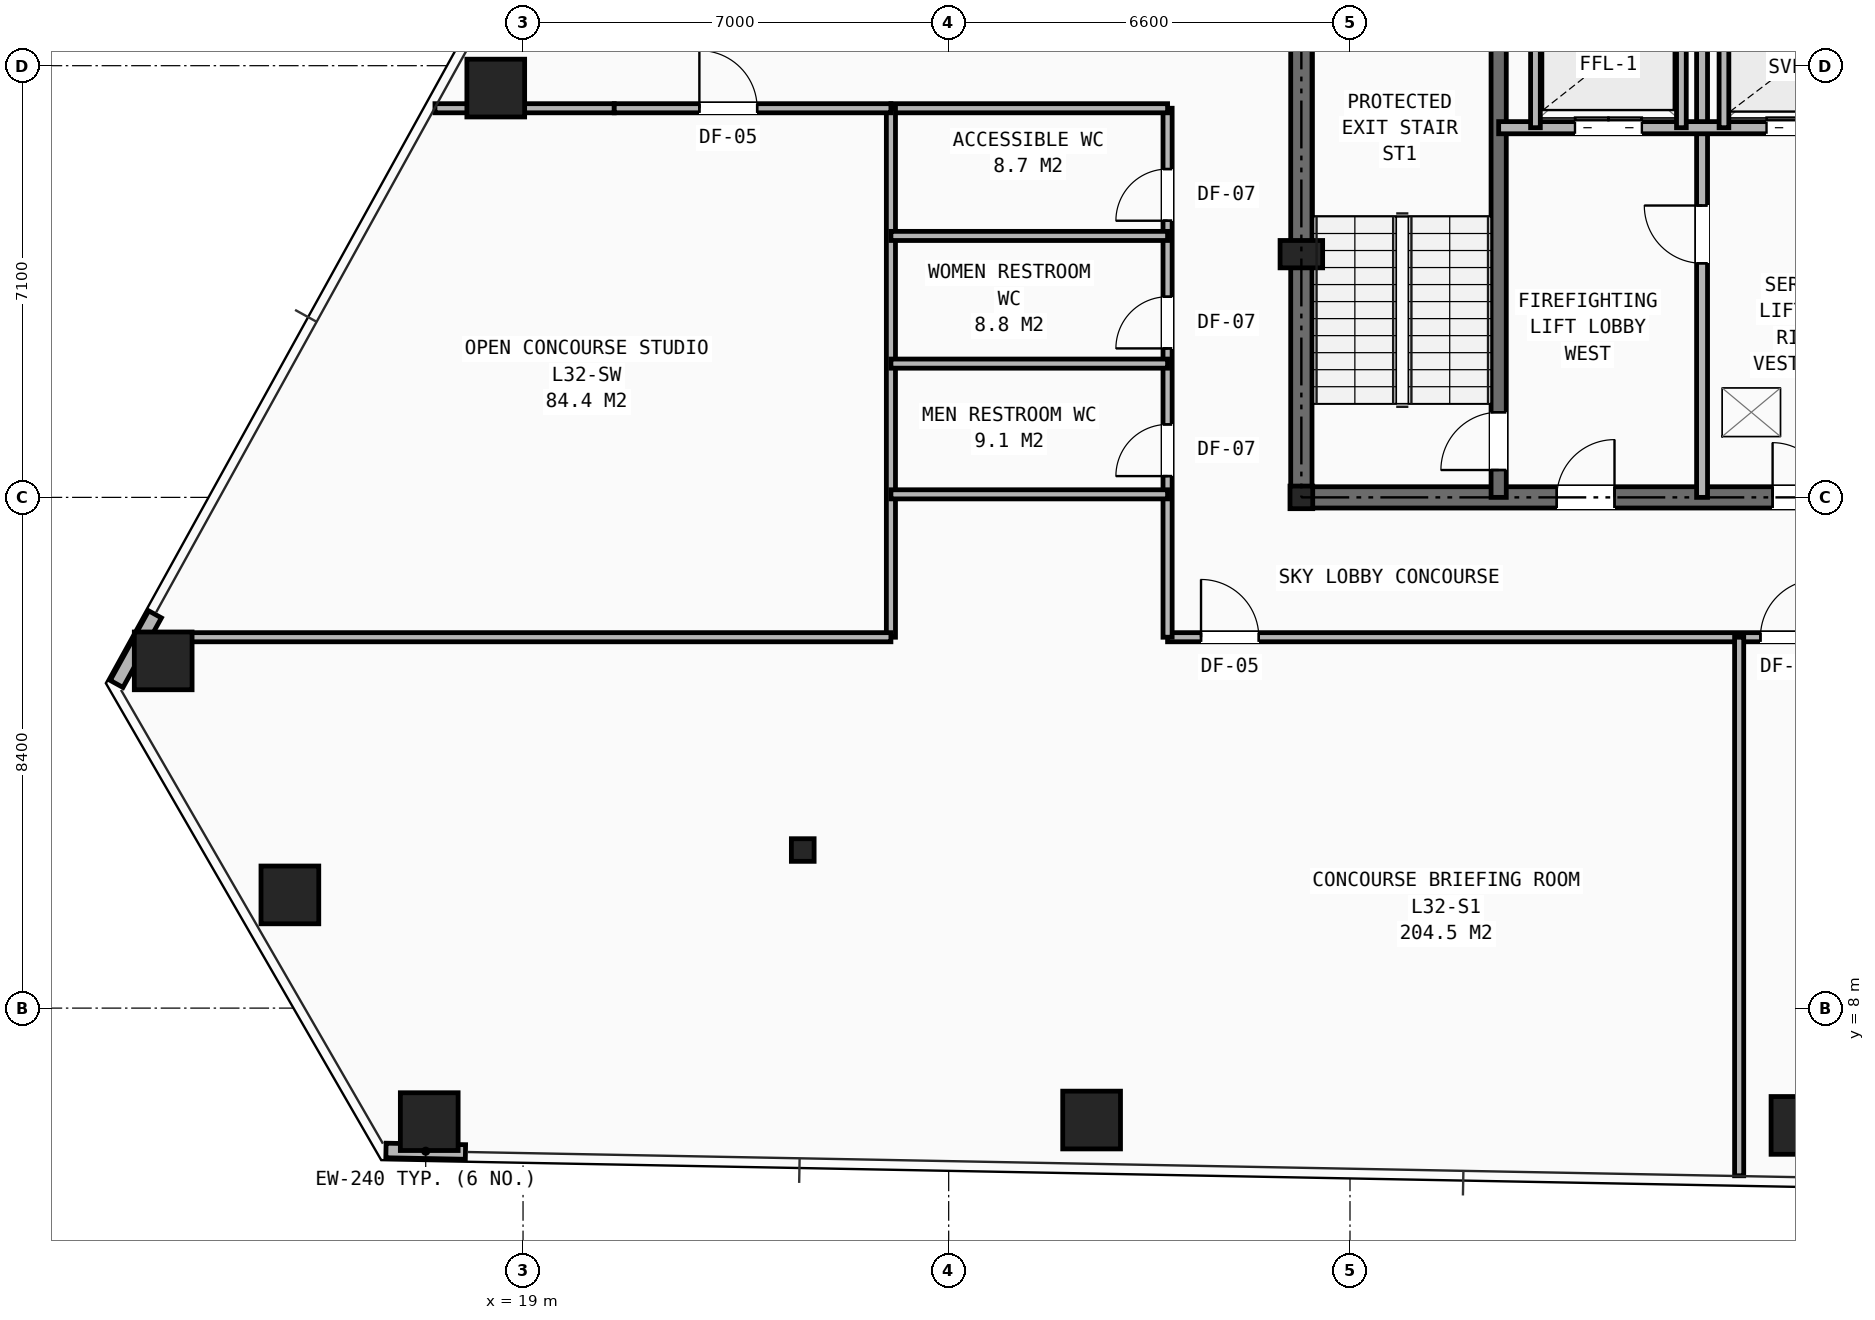
"""IFC4 building model, lengths in metres.
Left out: names, types, materials, properties, quantities, classifications, styles, units other than length and angle.
Written with IfcOpenShell. Run it as: python <this file> out.ifc"""

import sys

from ifc_helpers import new_model, si_unit, direction, frame, frame_2d, origin, origin_2d, place, context, subcontext, project, spatial, rectangle, hollow_rectangle, i_section, extrude, element, fill, save


model = new_model("IFC4")
c1 = context("Model", 3, precision=1e-05, world=origin(), true_north=direction((0.0, 1.0)))
c2 = subcontext(c1, "Body", "Model", "MODEL_VIEW")
j1 = project(units=[si_unit("LENGTHUNIT", "METRE"), si_unit("PLANEANGLEUNIT", "RADIAN")], contexts=[c1])
p1 = place(None, origin())
s1 = spatial("IfcSite", under=j1, at=p1, CompositionType="ELEMENT")
p2 = place(p1, origin())
s2 = spatial("IfcBuilding", under=s1, at=p2, CompositionType="ELEMENT")
p3 = place(p2, frame((0.0, 0.0, 111.8)))
s3 = spatial("IfcBuildingStorey", under=s2, at=p3, CompositionType="ELEMENT", Elevation=111.8)
for number, where, z_axis, x_axis in (
    (1, (31.8, 16.4, 0.0), (0.0, 0.0, 1.0), (1.0, 0.0, 0.0)),
    (2, (23.6, 10.6, 0.0), (0.0, 0.0, 1.0), (1.0, 0.0, 0.0)),
):
    element("IfcColumn", number, at=place(p3, frame(where, z_axis=z_axis, x_axis=x_axis)), inside=s3, PredefinedType="COLUMN", context=c2, shape_type="SweptSolid", body=[
        extrude(i_section(OverallWidth=0.374, OverallDepth=0.372, WebThickness=0.016, FlangeThickness=0.026, at=origin_2d()), origin(), (0.0, 0.0, 1.0), 4.2),
    ])
p4 = place(p3, frame((31.8, 20.4, 0.0), z_axis=(0.0, 0.0, 1.0), x_axis=(1.0, 0.0, 0.0)))
e3 = element("IfcColumn", 3, at=p4, inside=s3, PredefinedType="PILASTER", context=c2, shape_type="SweptSolid", body=[
    extrude(rectangle(XDim=0.7, YDim=0.45, at=origin_2d()), origin(), (0.0, 0.0, 1.0), 4.2),
])
for number, where, z_axis, x_axis in (
    (4, (18.552, 23.132, 0.0), (0.0, 0.0, 1.0), (1.0, 0.0, 0.0)),
    (5, (13.082, 13.711, 0.0), (0.0, 0.0, 1.0), (1.0, 0.0, 0.0)),
    (6, (15.166, 9.862, 0.0), (0.0, 0.0, 1.0), (1.0, 0.0, 0.0)),
    (7, (17.458, 6.133, 0.0), (0.0, 0.0, 1.0), (1.0, 0.0, 0.0)),
    (8, (28.351, 6.159, 0.0), (0.0, 0.0, 1.0), (1.0, 0.0, 0.0)),
    (9, (40.0, 6.071, 0.0), (0.0, 0.0, 1.0), (1.0, 0.0, 0.0)),
):
    element("IfcColumn", number, at=place(p3, frame(where, z_axis=z_axis, x_axis=x_axis)), inside=s3, PredefinedType="COLUMN", context=c2, shape_type="SweptSolid", body=[
        extrude(hollow_rectangle(XDim=0.95, YDim=0.95, WallThickness=0.065, at=origin_2d()), origin(), (0.0, 0.0, 1.0), 4.2),
    ])
for number, where, z_axis, x_axis in (
    (10, (12.948, 14.477, 0.0), (0.0, 0.0, 1.0), (-0.484, -0.875, 0.0)),
    (11, (16.746, 5.658, 0.0), (0.0, 0.0, 1.0), (1.0, -0.019, 0.0)),
):
    element("IfcWall", number, at=place(p3, frame(where, z_axis=z_axis, x_axis=x_axis)), inside=s3, PredefinedType="SHEAR", context=c2, shape_type="SweptSolid", body=[
        extrude(rectangle(XDim=1.308, YDim=0.24, at=frame_2d((0.654, 0.0))), origin(), (0.0, 0.0, 1.0), 3.243),
    ])
p5 = place(p3, frame((31.8, 16.4, 0.0), z_axis=(0.0, 0.0, 1.0), x_axis=(1.0, 0.0, 0.0)))
e12 = element("IfcWall", 12, at=p5, inside=s3, PredefinedType="SHEAR", context=c2, shape_type="SweptSolid", body=[
    extrude(rectangle(XDim=16.4, YDim=0.35, at=frame_2d((8.2, 0.0))), origin(), (0.0, 0.0, 1.0), 3.96),
])
p6 = place(p5, frame((7.75, 0.0, 0.0)))
e13 = element("IfcOpeningElement", 13, at=p6, cuts=e12, PredefinedType="OPENING", context=c2, shape_type="SweptSolid", body=[
    extrude(rectangle(XDim=0.9, YDim=2.1, at=frame_2d((0.45, 1.05))), frame((0.0, 0.185, 0.0), z_axis=(0.0, -1.0, 0.0), x_axis=(1.0, 0.0, 0.0)), (0.0, 0.0, 1.0), 0.37),
])
p7 = place(p5, frame((4.2, 0.0, 0.0)))
e14 = element("IfcOpeningElement", 14, at=p7, cuts=e12, PredefinedType="OPENING", context=c2, shape_type="SweptSolid", body=[
    extrude(rectangle(XDim=0.95, YDim=2.1, at=frame_2d((0.475, 1.05))), frame((0.0, 0.185, 0.0), z_axis=(0.0, -1.0, 0.0), x_axis=(1.0, 0.0, 0.0)), (0.0, 0.0, 1.0), 0.37),
])
p8 = place(p5, frame((10.6, 0.0, 0.0)))
e15 = element("IfcOpeningElement", 15, at=p8, cuts=e12, PredefinedType="OPENING", context=c2, shape_type="SweptSolid", body=[
    extrude(rectangle(XDim=0.95, YDim=2.1, at=frame_2d((0.475, 1.05))), frame((0.0, 0.185, 0.0), z_axis=(0.0, -1.0, 0.0), x_axis=(1.0, 0.0, 0.0)), (0.0, 0.0, 1.0), 0.37),
])
p9 = place(p3, frame((31.8, 16.4, 0.0), z_axis=(0.0, 0.0, 1.0), x_axis=(0.0, 1.0, 0.0)))
e16 = element("IfcWall", 16, at=p9, inside=s3, PredefinedType="SHEAR", context=c2, shape_type="SweptSolid", body=[
    extrude(rectangle(XDim=14.8, YDim=0.35, at=frame_2d((7.4, 0.0))), origin(), (0.0, 0.0, 1.0), 3.96),
])
p10 = place(p9, frame((11.0, 0.0, 0.0)))
e17 = element("IfcOpeningElement", 17, at=p10, cuts=e16, PredefinedType="OPENING", context=c2, shape_type="SweptSolid", body=[
    extrude(rectangle(XDim=1.1, YDim=2.15, at=frame_2d((0.55, 1.075))), frame((0.0, 0.185, 0.0), z_axis=(0.0, -1.0, 0.0), x_axis=(1.0, 0.0, 0.0)), (0.0, 0.0, 1.0), 0.37),
])
p11 = place(p3, frame((35.045, 16.4, 0.0), z_axis=(0.0, 0.0, 1.0), x_axis=(0.0, 1.0, 0.0)))
e18 = element("IfcWall", 18, at=p11, inside=s3, PredefinedType="SHEAR", context=c2, shape_type="SweptSolid", body=[
    extrude(rectangle(XDim=8.4, YDim=0.25, at=frame_2d((4.2, 0.0))), origin(), (0.0, 0.0, 1.0), 3.96),
])
p12 = place(p11, frame((0.45, 0.0, 0.0)))
e19 = element("IfcOpeningElement", 19, at=p12, cuts=e18, PredefinedType="OPENING", context=c2, shape_type="SweptSolid", body=[
    extrude(rectangle(XDim=0.95, YDim=2.1, at=frame_2d((0.475, 1.05))), frame((0.0, 0.135, 0.0), z_axis=(0.0, -1.0, 0.0), x_axis=(1.0, 0.0, 0.0)), (0.0, 0.0, 1.0), 0.27),
])
p13 = place(p3, frame((38.39, 16.4, 0.0), z_axis=(0.0, 0.0, 1.0), x_axis=(0.0, 1.0, 0.0)))
e20 = element("IfcWall", 20, at=p13, inside=s3, PredefinedType="PARTITIONING", context=c2, shape_type="SweptSolid", body=[
    extrude(rectangle(XDim=8.4, YDim=0.18, at=frame_2d((4.2, 0.0))), origin(), (0.0, 0.0, 1.0), 3.411),
])
p14 = place(p13, frame((3.85, 0.0, 0.0)))
e21 = element("IfcOpeningElement", 21, at=p14, cuts=e20, PredefinedType="OPENING", context=c2, shape_type="SweptSolid", body=[
    extrude(rectangle(XDim=0.95, YDim=2.1, at=frame_2d((0.475, 1.05))), frame((0.0, 0.1, 0.0), z_axis=(0.0, -1.0, 0.0), x_axis=(1.0, 0.0, 0.0)), (0.0, 0.0, 1.0), 0.2),
])
p15 = place(p3, frame((35.045, 22.48, 0.0), z_axis=(0.0, 0.0, 1.0), x_axis=(1.0, 0.0, 0.0)))
e22 = element("IfcWall", 22, at=p15, inside=s3, PredefinedType="SOLIDWALL", context=c2, shape_type="SweptSolid", body=[
    extrude(rectangle(XDim=9.91, YDim=0.2, at=frame_2d((4.955, 0.0))), origin(), (0.0, 0.0, 1.0), 3.96),
])
p16 = place(p15, frame((1.255, 0.0, 0.0)))
e23 = element("IfcOpeningElement", 23, at=p16, cuts=e22, PredefinedType="OPENING", context=c2, shape_type="SweptSolid", body=[
    extrude(rectangle(XDim=1.1, YDim=2.15, at=frame_2d((0.55, 1.075))), frame((0.0, 0.11, 0.0), z_axis=(0.0, -1.0, 0.0), x_axis=(1.0, 0.0, 0.0)), (0.0, 0.0, 1.0), 0.22),
])
p17 = place(p15, frame((7.555, 0.0, 0.0)))
e24 = element("IfcOpeningElement", 24, at=p17, cuts=e22, PredefinedType="OPENING", context=c2, shape_type="SweptSolid", body=[
    extrude(rectangle(XDim=1.1, YDim=2.15, at=frame_2d((0.55, 1.075))), frame((0.0, 0.11, 0.0), z_axis=(0.0, -1.0, 0.0), x_axis=(1.0, 0.0, 0.0)), (0.0, 0.0, 1.0), 0.22),
])
p18 = place(p15, frame((4.405, 0.0, 0.0)))
e25 = element("IfcOpeningElement", 25, at=p18, cuts=e22, PredefinedType="OPENING", context=c2, shape_type="SweptSolid", body=[
    extrude(rectangle(XDim=1.1, YDim=2.15, at=frame_2d((0.55, 1.075))), frame((0.0, 0.11, 0.0), z_axis=(0.0, -1.0, 0.0), x_axis=(1.0, 0.0, 0.0)), (0.0, 0.0, 1.0), 0.22),
])
for number, where, z_axis, x_axis in (
    (26, (35.65, 22.48, 0.0), (0.0, 0.0, 1.0), (0.0, 1.0, 0.0)),
    (27, (38.05, 22.48, 0.0), (0.0, 0.0, 1.0), (0.0, 1.0, 0.0)),
    (28, (38.75, 22.48, 0.0), (0.0, 0.0, 1.0), (0.0, 1.0, 0.0)),
):
    element("IfcWall", number, at=place(p3, frame(where, z_axis=z_axis, x_axis=x_axis)), inside=s3, PredefinedType="SOLIDWALL", context=c2, shape_type="SweptSolid", body=[
        extrude(rectangle(XDim=2.32, YDim=0.16, at=frame_2d((1.16, 0.0))), origin(), (0.0, 0.0, 1.0), 3.96),
    ])
p19 = place(p3, frame((29.6, 14.1, 0.0), z_axis=(0.0, 0.0, 1.0), x_axis=(1.0, 0.0, 0.0)))
e29 = element("IfcWall", 29, at=p19, inside=s3, PredefinedType="PARTITIONING", context=c2, shape_type="SweptSolid", body=[
    extrude(rectangle(XDim=18.6, YDim=0.15, at=frame_2d((9.3, 0.0))), origin(), (0.0, 0.0, 1.0), 2.975),
])
p20 = place(p19, frame((0.55, 0.0, 0.0)))
e30 = element("IfcOpeningElement", 30, at=p20, cuts=e29, PredefinedType="OPENING", context=c2, shape_type="SweptSolid", body=[
    extrude(rectangle(XDim=0.95, YDim=2.1, at=frame_2d((0.475, 1.05))), frame((0.0, 0.085, 0.0), z_axis=(0.0, -1.0, 0.0), x_axis=(1.0, 0.0, 0.0)), (0.0, 0.0, 1.0), 0.17),
])
p21 = place(p19, frame((9.75, 0.0, 0.0)))
e31 = element("IfcOpeningElement", 31, at=p21, cuts=e29, PredefinedType="OPENING", context=c2, shape_type="SweptSolid", body=[
    extrude(rectangle(XDim=0.95, YDim=2.1, at=frame_2d((0.475, 1.05))), frame((0.0, 0.085, 0.0), z_axis=(0.0, -1.0, 0.0), x_axis=(1.0, 0.0, 0.0)), (0.0, 0.0, 1.0), 0.17),
])
p22 = place(p3, frame((29.6, 14.1, 0.0), z_axis=(0.0, 0.0, 1.0), x_axis=(0.0, 1.0, 0.0)))
e32 = element("IfcWall", 32, at=p22, inside=s3, PredefinedType="PARTITIONING", context=c2, shape_type="SweptSolid", body=[
    extrude(rectangle(XDim=8.7, YDim=0.15, at=frame_2d((4.35, 0.0))), origin(), (0.0, 0.0, 1.0), 3.96),
])
p23 = place(p22, frame((2.65, 0.0, 0.0)))
e33 = element("IfcOpeningElement", 33, at=p23, cuts=e32, PredefinedType="OPENING", context=c2, shape_type="SweptSolid", body=[
    extrude(rectangle(XDim=0.85, YDim=2.05, at=frame_2d((0.425, 1.025))), frame((0.0, 0.085, 0.0), z_axis=(0.0, -1.0, 0.0), x_axis=(1.0, 0.0, 0.0)), (0.0, 0.0, 1.0), 0.17),
])
p24 = place(p22, frame((4.75, 0.0, 0.0)))
e34 = element("IfcOpeningElement", 34, at=p24, cuts=e32, PredefinedType="OPENING", context=c2, shape_type="SweptSolid", body=[
    extrude(rectangle(XDim=0.85, YDim=2.05, at=frame_2d((0.425, 1.025))), frame((0.0, 0.085, 0.0), z_axis=(0.0, -1.0, 0.0), x_axis=(1.0, 0.0, 0.0)), (0.0, 0.0, 1.0), 0.17),
])
p25 = place(p22, frame((6.85, 0.0, 0.0)))
e35 = element("IfcOpeningElement", 35, at=p25, cuts=e32, PredefinedType="OPENING", context=c2, shape_type="SweptSolid", body=[
    extrude(rectangle(XDim=0.85, YDim=2.05, at=frame_2d((0.425, 1.025))), frame((0.0, 0.085, 0.0), z_axis=(0.0, -1.0, 0.0), x_axis=(1.0, 0.0, 0.0)), (0.0, 0.0, 1.0), 0.17),
])
p26 = place(p3, frame((17.552, 22.8, 0.0), z_axis=(0.0, 0.0, 1.0), x_axis=(1.0, 0.0, 0.0)))
e36 = element("IfcWall", 36, at=p26, inside=s3, PredefinedType="PARTITIONING", context=c2, shape_type="SweptSolid", body=[
    extrude(rectangle(XDim=2.948, YDim=0.15, at=frame_2d((1.474, 0.0))), origin(), (0.0, 0.0, 1.0), 3.248),
])
p27 = place(p3, frame((25.05, 22.8, 0.0), z_axis=(0.0, 0.0, 1.0), x_axis=(1.0, 0.0, 0.0)))
e37 = element("IfcWall", 37, at=p27, inside=s3, PredefinedType="PARTITIONING", context=c2, shape_type="SweptSolid", body=[
    extrude(rectangle(XDim=4.55, YDim=0.15, at=frame_2d((2.275, 0.0))), origin(), (0.0, 0.0, 1.0), 3.96),
])
p28 = place(p3, frame((25.05, 14.1, 0.0), z_axis=(0.0, 0.0, 1.0), x_axis=(0.0, 1.0, 0.0)))
e38 = element("IfcWall", 38, at=p28, inside=s3, PredefinedType="PARTITIONING", context=c2, shape_type="SweptSolid", body=[
    extrude(rectangle(XDim=8.7, YDim=0.15, at=frame_2d((4.35, 0.0))), origin(), (0.0, 0.0, 1.0), 3.96),
])
for number, where, z_axis, x_axis in (
    (39, (25.05, 16.45, 0.0), (0.0, 0.0, 1.0), (1.0, 0.0, 0.0)),
    (40, (25.05, 18.6, 0.0), (0.0, 0.0, 1.0), (1.0, 0.0, 0.0)),
    (41, (25.05, 20.7, 0.0), (0.0, 0.0, 1.0), (1.0, 0.0, 0.0)),
):
    element("IfcWall", number, at=place(p3, frame(where, z_axis=z_axis, x_axis=x_axis)), inside=s3, PredefinedType="PARTITIONING", context=c2, shape_type="SweptSolid", body=[
        extrude(rectangle(XDim=4.55, YDim=0.15, at=frame_2d((2.275, 0.0))), origin(), (0.0, 0.0, 1.0), 3.96),
    ])
p29 = place(p3, frame((39.0, 5.243, 0.0), z_axis=(0.0, 0.0, 1.0), x_axis=(0.0, 1.0, 0.0)))
e42 = element("IfcWall", 42, at=p29, inside=s3, PredefinedType="PARTITIONING", context=c2, shape_type="SweptSolid", body=[
    extrude(rectangle(XDim=8.857, YDim=0.15, at=frame_2d((4.429, 0.0))), origin(), (0.0, 0.0, 1.0), 2.975),
])
p30 = place(p3, frame((12.746, 14.1, 0.0), z_axis=(0.0, 0.0, 1.0), x_axis=(1.0, 0.0, 0.0)))
e43 = element("IfcWall", 43, at=p30, inside=s3, PredefinedType="PARTITIONING", context=c2, shape_type="SweptSolid", body=[
    extrude(rectangle(XDim=12.304, YDim=0.15, at=frame_2d((6.152, 0.0))), origin(), (0.0, 0.0, 1.0), 2.975),
])
p31 = place(p3, frame((20.5, 22.8, 0.0), z_axis=(0.0, 0.0, 1.0), x_axis=(1.0, 0.0, 0.0)))
e44 = element("IfcWall", 44, at=p31, inside=s3, PredefinedType="PARTITIONING", context=c2, shape_type="SweptSolid", body=[
    extrude(rectangle(XDim=4.55, YDim=0.15, at=frame_2d((2.275, 0.0))), origin(), (0.0, 0.0, 1.0), 3.96),
])
p32 = place(p31, frame((1.4, 0.0, 0.0)))
e45 = element("IfcOpeningElement", 45, at=p32, cuts=e44, PredefinedType="OPENING", context=c2, shape_type="SweptSolid", body=[
    extrude(rectangle(XDim=0.95, YDim=2.1, at=frame_2d((0.475, 1.05))), frame((0.0, 0.085, 0.0), z_axis=(0.0, -1.0, 0.0), x_axis=(1.0, 0.0, 0.0)), (0.0, 0.0, 1.0), 0.17),
])
p33 = place(p6, origin())
e46 = element("IfcDoor", 46, at=p33, inside=s3, OperationType="SINGLE_SWING_LEFT", PredefinedType="DOOR", context=c2, shape_type="SweptSolid", body=[
    extrude(rectangle(XDim=0.9, YDim=2.1, at=frame_2d((0.45, 1.05))), frame((0.0, 0.025, 0.0), z_axis=(0.0, -1.0, 0.0), x_axis=(1.0, 0.0, 0.0)), (0.0, 0.0, 1.0), 0.05),
])
fill(e13, e46)
p34 = place(p14, origin())
e47 = element("IfcDoor", 47, at=p34, inside=s3, OperationType="SINGLE_SWING_RIGHT", PredefinedType="DOOR", context=c2, shape_type="SweptSolid", body=[
    extrude(rectangle(XDim=0.95, YDim=2.1, at=frame_2d((0.475, 1.05))), frame((0.0, 0.025, 0.0), z_axis=(0.0, -1.0, 0.0), x_axis=(1.0, 0.0, 0.0)), (0.0, 0.0, 1.0), 0.05),
])
fill(e21, e47)
p35 = place(p12, origin())
e48 = element("IfcDoor", 48, at=p35, inside=s3, OperationType="SINGLE_SWING_LEFT", PredefinedType="DOOR", context=c2, shape_type="SweptSolid", body=[
    extrude(rectangle(XDim=0.95, YDim=2.1, at=frame_2d((0.475, 1.05))), frame((0.0, 0.025, 0.0), z_axis=(0.0, -1.0, 0.0), x_axis=(1.0, 0.0, 0.0)), (0.0, 0.0, 1.0), 0.05),
])
fill(e19, e48)
p36 = place(p7, origin())
e49 = element("IfcDoor", 49, at=p36, inside=s3, OperationType="SINGLE_SWING_RIGHT", PredefinedType="DOOR", context=c2, shape_type="SweptSolid", body=[
    extrude(rectangle(XDim=0.95, YDim=2.1, at=frame_2d((0.475, 1.05))), frame((0.0, 0.025, 0.0), z_axis=(0.0, -1.0, 0.0), x_axis=(1.0, 0.0, 0.0)), (0.0, 0.0, 1.0), 0.05),
])
fill(e14, e49)
p37 = place(p16, origin())
e50 = element("IfcDoor", 50, at=p37, inside=s3, OperationType="DOUBLE_DOOR_SLIDING", PredefinedType="DOOR", context=c2, shape_type="SweptSolid", body=[
    extrude(rectangle(XDim=1.1, YDim=2.15, at=frame_2d((0.55, 1.075))), frame((0.0, 0.025, 0.0), z_axis=(0.0, -1.0, 0.0), x_axis=(1.0, 0.0, 0.0)), (0.0, 0.0, 1.0), 0.05),
])
fill(e23, e50)
p38 = place(p18, origin())
e51 = element("IfcDoor", 51, at=p38, inside=s3, OperationType="DOUBLE_DOOR_SLIDING", PredefinedType="DOOR", context=c2, shape_type="SweptSolid", body=[
    extrude(rectangle(XDim=1.1, YDim=2.15, at=frame_2d((0.55, 1.075))), frame((0.0, 0.025, 0.0), z_axis=(0.0, -1.0, 0.0), x_axis=(1.0, 0.0, 0.0)), (0.0, 0.0, 1.0), 0.05),
])
fill(e25, e51)
p39 = place(p23, origin())
e52 = element("IfcDoor", 52, at=p39, inside=s3, OperationType="SINGLE_SWING_LEFT", PredefinedType="DOOR", context=c2, shape_type="SweptSolid", body=[
    extrude(rectangle(XDim=0.85, YDim=2.05, at=frame_2d((0.425, 1.025))), frame((0.0, 0.025, 0.0), z_axis=(0.0, -1.0, 0.0), x_axis=(1.0, 0.0, 0.0)), (0.0, 0.0, 1.0), 0.05),
])
fill(e33, e52)
p40 = place(p24, origin())
e53 = element("IfcDoor", 53, at=p40, inside=s3, OperationType="SINGLE_SWING_LEFT", PredefinedType="DOOR", context=c2, shape_type="SweptSolid", body=[
    extrude(rectangle(XDim=0.85, YDim=2.05, at=frame_2d((0.425, 1.025))), frame((0.0, 0.025, 0.0), z_axis=(0.0, -1.0, 0.0), x_axis=(1.0, 0.0, 0.0)), (0.0, 0.0, 1.0), 0.05),
])
fill(e34, e53)
p41 = place(p25, origin())
e54 = element("IfcDoor", 54, at=p41, inside=s3, OperationType="SINGLE_SWING_LEFT", PredefinedType="DOOR", context=c2, shape_type="SweptSolid", body=[
    extrude(rectangle(XDim=0.85, YDim=2.05, at=frame_2d((0.425, 1.025))), frame((0.0, 0.025, 0.0), z_axis=(0.0, -1.0, 0.0), x_axis=(1.0, 0.0, 0.0)), (0.0, 0.0, 1.0), 0.05),
])
fill(e35, e54)
p42 = place(p20, origin())
e55 = element("IfcDoor", 55, at=p42, inside=s3, OperationType="SINGLE_SWING_LEFT", PredefinedType="DOOR", context=c2, shape_type="SweptSolid", body=[
    extrude(rectangle(XDim=0.95, YDim=2.1, at=frame_2d((0.475, 1.05))), frame((0.0, 0.025, 0.0), z_axis=(0.0, -1.0, 0.0), x_axis=(1.0, 0.0, 0.0)), (0.0, 0.0, 1.0), 0.05),
])
fill(e30, e55)
p43 = place(p21, origin())
e56 = element("IfcDoor", 56, at=p43, inside=s3, OperationType="SINGLE_SWING_RIGHT", PredefinedType="DOOR", context=c2, shape_type="SweptSolid", body=[
    extrude(rectangle(XDim=0.95, YDim=2.1, at=frame_2d((0.475, 1.05))), frame((0.0, 0.025, 0.0), z_axis=(0.0, -1.0, 0.0), x_axis=(1.0, 0.0, 0.0)), (0.0, 0.0, 1.0), 0.05),
])
fill(e31, e56)
p44 = place(p32, origin())
e57 = element("IfcDoor", 57, at=p44, inside=s3, OperationType="SINGLE_SWING_LEFT", PredefinedType="DOOR", context=c2, shape_type="SweptSolid", body=[
    extrude(rectangle(XDim=0.95, YDim=2.1, at=frame_2d((0.475, 1.05))), frame((0.0, 0.025, 0.0), z_axis=(0.0, -1.0, 0.0), x_axis=(1.0, 0.0, 0.0)), (0.0, 0.0, 1.0), 0.05),
])
fill(e45, e57)
save(model, sys.argv[1])
